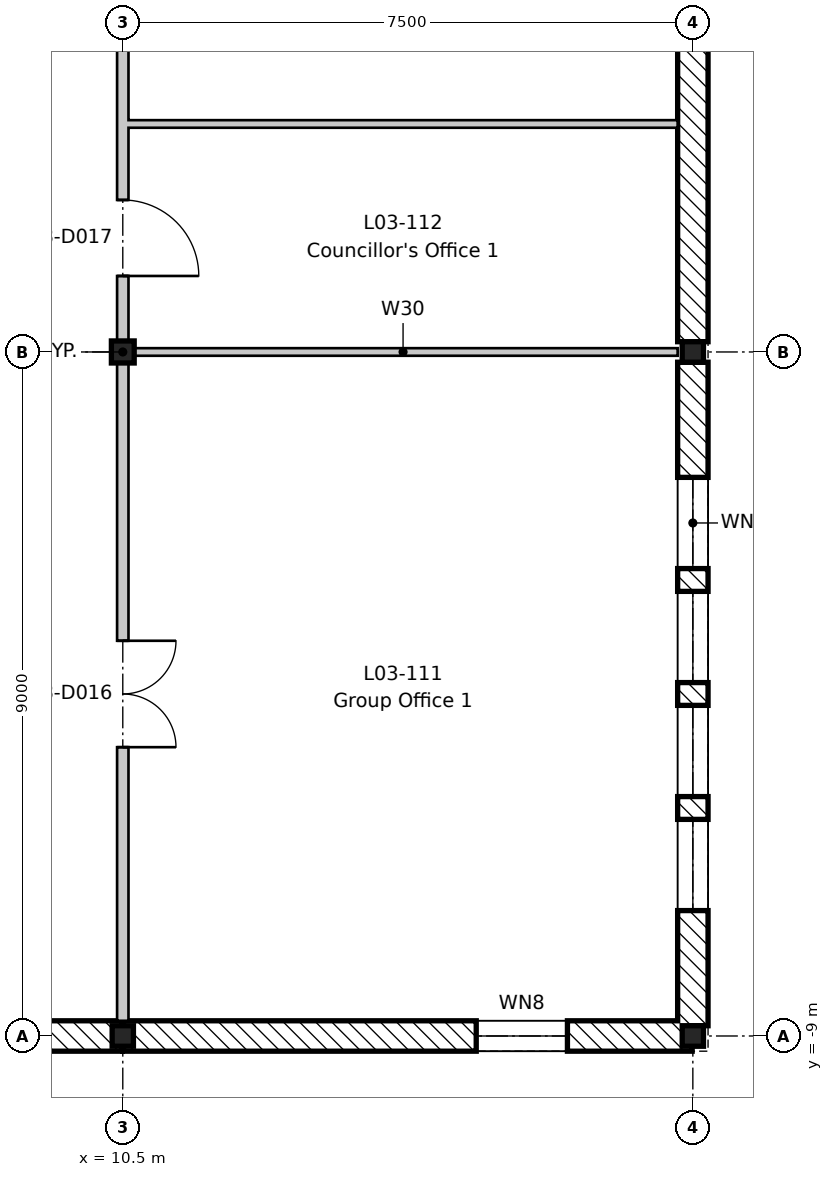
"""IFC4 building model, lengths in metres.
Left out: names, types, materials, properties, quantities, classifications, styles, units other than length and angle.
Written with IfcOpenShell. Run it as: python <this file> out.ifc"""

import sys

from ifc_helpers import new_model, si_unit, direction, frame, frame_2d, origin, origin_2d, place, context, subcontext, project, spatial, rectangle, i_section, extrude, element, fill, save


model = new_model("IFC4")
c1 = context("Model", 3, precision=1e-05, world=origin(), true_north=direction((0.0, 1.0)))
c2 = subcontext(c1, "Body", "Model", "MODEL_VIEW")
j1 = project(units=[si_unit("LENGTHUNIT", "METRE"), si_unit("PLANEANGLEUNIT", "RADIAN")], contexts=[c1])
p1 = place(None, origin())
s1 = spatial("IfcSite", under=j1, at=p1, CompositionType="ELEMENT")
p2 = place(p1, origin())
s2 = spatial("IfcBuilding", under=s1, at=p2, CompositionType="ELEMENT")
p3 = place(p2, frame((0.0, 0.0, 14.4)))
s3 = spatial("IfcBuildingStorey", under=s2, at=p3, CompositionType="ELEMENT", Elevation=14.4)
p4 = place(p3, frame((10.5, -9.0, -0.2), z_axis=(0.0, 0.0, 1.0), x_axis=(1.0, 0.0, 0.0)))
e1 = element("IfcColumn", 1, at=p4, inside=s3, PredefinedType="COLUMN", context=c2, shape_type="SweptSolid", body=[
    extrude(i_section(OverallWidth=0.28, OverallDepth=0.27, WebThickness=0.008, FlangeThickness=0.013, FilletRadius=0.024, at=origin_2d()), origin(), (0.0, 0.0, 1.0), 4.2),
])
p5 = place(p3, frame((10.5, 0.0, -0.2), z_axis=(0.0, 0.0, 1.0), x_axis=(1.0, 0.0, 0.0)))
e2 = element("IfcColumn", 2, at=p5, inside=s3, PredefinedType="COLUMN", context=c2, shape_type="SweptSolid", body=[
    extrude(i_section(OverallWidth=0.3, OverallDepth=0.29, WebThickness=0.009, FlangeThickness=0.014, FilletRadius=0.027, at=origin_2d()), origin(), (0.0, 0.0, 1.0), 4.2),
])
for number, where, z_axis, x_axis in (
    (3, (18.0, -9.0, -0.2), (0.0, 0.0, 1.0), (1.0, 0.0, 0.0)),
    (4, (18.0, 0.0, -0.2), (0.0, 0.0, 1.0), (1.0, 0.0, 0.0)),
):
    element("IfcColumn", number, at=place(p3, frame(where, z_axis=z_axis, x_axis=x_axis)), inside=s3, PredefinedType="COLUMN", context=c2, shape_type="SweptSolid", body=[
        extrude(i_section(OverallWidth=0.28, OverallDepth=0.27, WebThickness=0.008, FlangeThickness=0.013, FilletRadius=0.024, at=origin_2d()), origin(), (0.0, 0.0, 1.0), 4.2),
    ])
p6 = place(p3, frame((18.0, -0.135, 0.0), z_axis=(0.0, 0.0, 1.0), x_axis=(0.0, -1.0, 0.0)))
e5 = element("IfcWall", 5, at=p6, inside=s3, PredefinedType="STANDARD", context=c2, shape_type="SweptSolid", body=[
    extrude(rectangle(XDim=8.73, YDim=0.4, at=frame_2d((4.365, 0.0))), origin(), (0.0, 0.0, 1.0), 3.6),
])
p7 = place(p6, frame((6.015, 0.0, 0.6)))
e6 = element("IfcOpeningElement", 6, at=p7, cuts=e5, PredefinedType="OPENING", context=c2, shape_type="SweptSolid", body=[
    extrude(rectangle(XDim=1.2, YDim=2.7, at=frame_2d((0.6, 1.35))), frame((0.0, 0.21, 0.0), z_axis=(0.0, -1.0, 0.0), x_axis=(1.0, 0.0, 0.0)), (0.0, 0.0, 1.0), 0.42),
])
p8 = place(p6, frame((4.515, 0.0, 0.6)))
e7 = element("IfcOpeningElement", 7, at=p8, cuts=e5, PredefinedType="OPENING", context=c2, shape_type="SweptSolid", body=[
    extrude(rectangle(XDim=1.2, YDim=2.7, at=frame_2d((0.6, 1.35))), frame((0.0, 0.21, 0.0), z_axis=(0.0, -1.0, 0.0), x_axis=(1.0, 0.0, 0.0)), (0.0, 0.0, 1.0), 0.42),
])
p9 = place(p6, frame((3.015, 0.0, 0.6)))
e8 = element("IfcOpeningElement", 8, at=p9, cuts=e5, PredefinedType="OPENING", context=c2, shape_type="SweptSolid", body=[
    extrude(rectangle(XDim=1.2, YDim=2.7, at=frame_2d((0.6, 1.35))), frame((0.0, 0.21, 0.0), z_axis=(0.0, -1.0, 0.0), x_axis=(1.0, 0.0, 0.0)), (0.0, 0.0, 1.0), 0.42),
])
p10 = place(p6, frame((1.515, 0.0, 0.6)))
e9 = element("IfcOpeningElement", 9, at=p10, cuts=e5, PredefinedType="OPENING", context=c2, shape_type="SweptSolid", body=[
    extrude(rectangle(XDim=1.2, YDim=2.7, at=frame_2d((0.6, 1.35))), frame((0.0, 0.21, 0.0), z_axis=(0.0, -1.0, 0.0), x_axis=(1.0, 0.0, 0.0)), (0.0, 0.0, 1.0), 0.42),
])
p11 = place(p3, frame((18.0, 8.865, 0.0), z_axis=(0.0, 0.0, 1.0), x_axis=(0.0, -1.0, 0.0)))
e10 = element("IfcWall", 10, at=p11, inside=s3, PredefinedType="STANDARD", context=c2, shape_type="SweptSolid", body=[
    extrude(rectangle(XDim=8.73, YDim=0.4, at=frame_2d((4.365, 0.0))), origin(), (0.0, 0.0, 1.0), 3.6),
])
p12 = place(p3, frame((10.491, -9.0, 0.0), z_axis=(0.0, 0.0, 1.0), x_axis=(-1.0, 0.0, 0.0)))
e11 = element("IfcWall", 11, at=p12, inside=s3, PredefinedType="STANDARD", context=c2, shape_type="SweptSolid", body=[
    extrude(rectangle(XDim=2.982, YDim=0.4, at=frame_2d((1.491, 0.0))), origin(), (0.0, 0.0, 1.0), 3.8),
])
p13 = place(p3, frame((17.991, -9.0, 0.0), z_axis=(0.0, 0.0, 1.0), x_axis=(-1.0, 0.0, 0.0)))
e12 = element("IfcWall", 12, at=p13, inside=s3, PredefinedType="STANDARD", context=c2, shape_type="SweptSolid", body=[
    extrude(rectangle(XDim=7.482, YDim=0.4, at=frame_2d((3.741, 0.0))), origin(), (0.0, 0.0, 1.0), 3.67),
])
p14 = place(p13, frame((1.641, 0.0, 0.6)))
e13 = element("IfcOpeningElement", 13, at=p14, cuts=e12, PredefinedType="OPENING", context=c2, shape_type="SweptSolid", body=[
    extrude(rectangle(XDim=1.2, YDim=2.7, at=frame_2d((0.6, 1.35))), frame((0.0, 0.21, 0.0), z_axis=(0.0, -1.0, 0.0), x_axis=(1.0, 0.0, 0.0)), (0.0, 0.0, 1.0), 0.42),
])
p15 = place(p3, frame((10.575, 0.0, 0.0), z_axis=(0.0, 0.0, 1.0), x_axis=(1.0, 0.0, 0.0)))
e14 = element("IfcWall", 14, at=p15, inside=s3, PredefinedType="PARTITIONING", context=c2, shape_type="SweptSolid", body=[
    extrude(rectangle(XDim=7.225, YDim=0.1, at=frame_2d((3.613, 0.0))), origin(), (0.0, 0.0, 1.0), 3.65),
])
p16 = place(p3, frame((10.575, 3.0, 0.0), z_axis=(0.0, 0.0, 1.0), x_axis=(1.0, 0.0, 0.0)))
e15 = element("IfcWall", 15, at=p16, inside=s3, PredefinedType="PARTITIONING", context=c2, shape_type="SweptSolid", body=[
    extrude(rectangle(XDim=7.225, YDim=0.1, at=frame_2d((3.613, 0.0))), origin(), (0.0, 0.0, 1.0), 4.0),
])
p17 = place(p3, frame((10.5, -8.8, 0.0), z_axis=(0.0, 0.0, 1.0), x_axis=(0.0, 1.0, 0.0)))
e16 = element("IfcWall", 16, at=p17, inside=s3, PredefinedType="PARTITIONING", context=c2, shape_type="SweptSolid", body=[
    extrude(rectangle(XDim=79.3, YDim=0.15, at=frame_2d((39.65, 0.0))), origin(), (0.0, 0.0, 1.0), 3.48),
])
p18 = place(p17, frame((3.6, 0.0, 0.0)))
e17 = element("IfcOpeningElement", 17, at=p18, cuts=e16, PredefinedType="OPENING", context=c2, shape_type="SweptSolid", body=[
    extrude(rectangle(XDim=1.4, YDim=2.1, at=frame_2d((0.7, 1.05))), frame((0.0, 0.085, 0.0), z_axis=(0.0, -1.0, 0.0), x_axis=(1.0, 0.0, 0.0)), (0.0, 0.0, 1.0), 0.17),
])
p19 = place(p17, frame((9.8, 0.0, 0.0)))
e18 = element("IfcOpeningElement", 18, at=p19, cuts=e16, PredefinedType="OPENING", context=c2, shape_type="SweptSolid", body=[
    extrude(rectangle(XDim=1.0, YDim=2.1, at=frame_2d((0.5, 1.05))), frame((0.0, 0.085, 0.0), z_axis=(0.0, -1.0, 0.0), x_axis=(1.0, 0.0, 0.0)), (0.0, 0.0, 1.0), 0.17),
])
p20 = place(p17, frame((12.8, 0.0, 0.0)))
e19 = element("IfcOpeningElement", 19, at=p20, cuts=e16, PredefinedType="OPENING", context=c2, shape_type="SweptSolid", body=[
    extrude(rectangle(XDim=1.0, YDim=2.1, at=frame_2d((0.5, 1.05))), frame((0.0, 0.085, 0.0), z_axis=(0.0, -1.0, 0.0), x_axis=(1.0, 0.0, 0.0)), (0.0, 0.0, 1.0), 0.17),
])
p21 = place(p17, frame((15.8, 0.0, 0.0)))
e20 = element("IfcOpeningElement", 20, at=p21, cuts=e16, PredefinedType="OPENING", context=c2, shape_type="SweptSolid", body=[
    extrude(rectangle(XDim=1.0, YDim=2.1, at=frame_2d((0.5, 1.05))), frame((0.0, 0.085, 0.0), z_axis=(0.0, -1.0, 0.0), x_axis=(1.0, 0.0, 0.0)), (0.0, 0.0, 1.0), 0.17),
])
p22 = place(p17, frame((18.8, 0.0, 0.0)))
e21 = element("IfcOpeningElement", 21, at=p22, cuts=e16, PredefinedType="OPENING", context=c2, shape_type="SweptSolid", body=[
    extrude(rectangle(XDim=1.0, YDim=2.1, at=frame_2d((0.5, 1.05))), frame((0.0, 0.085, 0.0), z_axis=(0.0, -1.0, 0.0), x_axis=(1.0, 0.0, 0.0)), (0.0, 0.0, 1.0), 0.17),
])
p23 = place(p17, frame((21.8, 0.0, 0.0)))
e22 = element("IfcOpeningElement", 22, at=p23, cuts=e16, PredefinedType="OPENING", context=c2, shape_type="SweptSolid", body=[
    extrude(rectangle(XDim=1.0, YDim=2.1, at=frame_2d((0.5, 1.05))), frame((0.0, 0.085, 0.0), z_axis=(0.0, -1.0, 0.0), x_axis=(1.0, 0.0, 0.0)), (0.0, 0.0, 1.0), 0.17),
])
p24 = place(p17, frame((27.6, 0.0, 0.0)))
e23 = element("IfcOpeningElement", 23, at=p24, cuts=e16, PredefinedType="OPENING", context=c2, shape_type="SweptSolid", body=[
    extrude(rectangle(XDim=1.4, YDim=2.1, at=frame_2d((0.7, 1.05))), frame((0.0, 0.085, 0.0), z_axis=(0.0, -1.0, 0.0), x_axis=(1.0, 0.0, 0.0)), (0.0, 0.0, 1.0), 0.17),
])
p25 = place(p17, frame((36.55, 0.0, 0.0)))
e24 = element("IfcOpeningElement", 24, at=p25, cuts=e16, PredefinedType="OPENING", context=c2, shape_type="SweptSolid", body=[
    extrude(rectangle(XDim=1.0, YDim=2.1, at=frame_2d((0.5, 1.05))), frame((0.0, 0.085, 0.0), z_axis=(0.0, -1.0, 0.0), x_axis=(1.0, 0.0, 0.0)), (0.0, 0.0, 1.0), 0.17),
])
p26 = place(p17, frame((39.8, 0.0, 0.0)))
e25 = element("IfcOpeningElement", 25, at=p26, cuts=e16, PredefinedType="OPENING", context=c2, shape_type="SweptSolid", body=[
    extrude(rectangle(XDim=1.0, YDim=2.1, at=frame_2d((0.5, 1.05))), frame((0.0, 0.085, 0.0), z_axis=(0.0, -1.0, 0.0), x_axis=(1.0, 0.0, 0.0)), (0.0, 0.0, 1.0), 0.17),
])
p27 = place(p17, frame((42.8, 0.0, 0.0)))
e26 = element("IfcOpeningElement", 26, at=p27, cuts=e16, PredefinedType="OPENING", context=c2, shape_type="SweptSolid", body=[
    extrude(rectangle(XDim=1.0, YDim=2.1, at=frame_2d((0.5, 1.05))), frame((0.0, 0.085, 0.0), z_axis=(0.0, -1.0, 0.0), x_axis=(1.0, 0.0, 0.0)), (0.0, 0.0, 1.0), 0.17),
])
p28 = place(p17, frame((47.3, 0.0, 0.0)))
e27 = element("IfcOpeningElement", 27, at=p28, cuts=e16, PredefinedType="OPENING", context=c2, shape_type="SweptSolid", body=[
    extrude(rectangle(XDim=1.0, YDim=2.1, at=frame_2d((0.5, 1.05))), frame((0.0, 0.085, 0.0), z_axis=(0.0, -1.0, 0.0), x_axis=(1.0, 0.0, 0.0)), (0.0, 0.0, 1.0), 0.17),
])
p29 = place(p17, frame((51.8, 0.0, 0.0)))
e28 = element("IfcOpeningElement", 28, at=p29, cuts=e16, PredefinedType="OPENING", context=c2, shape_type="SweptSolid", body=[
    extrude(rectangle(XDim=1.0, YDim=2.1, at=frame_2d((0.5, 1.05))), frame((0.0, 0.085, 0.0), z_axis=(0.0, -1.0, 0.0), x_axis=(1.0, 0.0, 0.0)), (0.0, 0.0, 1.0), 0.17),
])
p30 = place(p17, frame((56.3, 0.0, 0.0)))
e29 = element("IfcOpeningElement", 29, at=p30, cuts=e16, PredefinedType="OPENING", context=c2, shape_type="SweptSolid", body=[
    extrude(rectangle(XDim=1.0, YDim=2.1, at=frame_2d((0.5, 1.05))), frame((0.0, 0.085, 0.0), z_axis=(0.0, -1.0, 0.0), x_axis=(1.0, 0.0, 0.0)), (0.0, 0.0, 1.0), 0.17),
])
p31 = place(p17, frame((60.8, 0.0, 0.0)))
e30 = element("IfcOpeningElement", 30, at=p31, cuts=e16, PredefinedType="OPENING", context=c2, shape_type="SweptSolid", body=[
    extrude(rectangle(XDim=1.0, YDim=2.1, at=frame_2d((0.5, 1.05))), frame((0.0, 0.085, 0.0), z_axis=(0.0, -1.0, 0.0), x_axis=(1.0, 0.0, 0.0)), (0.0, 0.0, 1.0), 0.17),
])
p32 = place(p17, frame((63.8, 0.0, 0.0)))
e31 = element("IfcOpeningElement", 31, at=p32, cuts=e16, PredefinedType="OPENING", context=c2, shape_type="SweptSolid", body=[
    extrude(rectangle(XDim=1.0, YDim=2.1, at=frame_2d((0.5, 1.05))), frame((0.0, 0.085, 0.0), z_axis=(0.0, -1.0, 0.0), x_axis=(1.0, 0.0, 0.0)), (0.0, 0.0, 1.0), 0.17),
])
p33 = place(p17, frame((66.8, 0.0, 0.0)))
e32 = element("IfcOpeningElement", 32, at=p33, cuts=e16, PredefinedType="OPENING", context=c2, shape_type="SweptSolid", body=[
    extrude(rectangle(XDim=1.0, YDim=2.1, at=frame_2d((0.5, 1.05))), frame((0.0, 0.085, 0.0), z_axis=(0.0, -1.0, 0.0), x_axis=(1.0, 0.0, 0.0)), (0.0, 0.0, 1.0), 0.17),
])
p34 = place(p17, frame((69.8, 0.0, 0.0)))
e33 = element("IfcOpeningElement", 33, at=p34, cuts=e16, PredefinedType="OPENING", context=c2, shape_type="SweptSolid", body=[
    extrude(rectangle(XDim=1.0, YDim=2.1, at=frame_2d((0.5, 1.05))), frame((0.0, 0.085, 0.0), z_axis=(0.0, -1.0, 0.0), x_axis=(1.0, 0.0, 0.0)), (0.0, 0.0, 1.0), 0.17),
])
p35 = place(p17, frame((72.8, 0.0, 0.0)))
e34 = element("IfcOpeningElement", 34, at=p35, cuts=e16, PredefinedType="OPENING", context=c2, shape_type="SweptSolid", body=[
    extrude(rectangle(XDim=1.0, YDim=2.1, at=frame_2d((0.5, 1.05))), frame((0.0, 0.085, 0.0), z_axis=(0.0, -1.0, 0.0), x_axis=(1.0, 0.0, 0.0)), (0.0, 0.0, 1.0), 0.17),
])
p36 = place(p7, origin())
e35 = element("IfcWindow", 35, at=p36, inside=s3, PartitioningType="SINGLE_PANEL", PredefinedType="WINDOW", context=c2, shape_type="SweptSolid", body=[
    extrude(rectangle(XDim=1.2, YDim=2.7, at=frame_2d((0.6, 1.35))), frame((0.0, 0.03, 0.0), z_axis=(0.0, -1.0, 0.0), x_axis=(1.0, 0.0, 0.0)), (0.0, 0.0, 1.0), 0.06),
])
fill(e6, e35)
p37 = place(p8, origin())
e36 = element("IfcWindow", 36, at=p37, inside=s3, PartitioningType="SINGLE_PANEL", PredefinedType="WINDOW", context=c2, shape_type="SweptSolid", body=[
    extrude(rectangle(XDim=1.2, YDim=2.7, at=frame_2d((0.6, 1.35))), frame((0.0, 0.03, 0.0), z_axis=(0.0, -1.0, 0.0), x_axis=(1.0, 0.0, 0.0)), (0.0, 0.0, 1.0), 0.06),
])
fill(e7, e36)
p38 = place(p9, origin())
e37 = element("IfcWindow", 37, at=p38, inside=s3, PartitioningType="SINGLE_PANEL", PredefinedType="WINDOW", context=c2, shape_type="SweptSolid", body=[
    extrude(rectangle(XDim=1.2, YDim=2.7, at=frame_2d((0.6, 1.35))), frame((0.0, 0.03, 0.0), z_axis=(0.0, -1.0, 0.0), x_axis=(1.0, 0.0, 0.0)), (0.0, 0.0, 1.0), 0.06),
])
fill(e8, e37)
p39 = place(p10, origin())
e38 = element("IfcWindow", 38, at=p39, inside=s3, PartitioningType="SINGLE_PANEL", PredefinedType="WINDOW", context=c2, shape_type="SweptSolid", body=[
    extrude(rectangle(XDim=1.2, YDim=2.7, at=frame_2d((0.6, 1.35))), frame((0.0, 0.03, 0.0), z_axis=(0.0, -1.0, 0.0), x_axis=(1.0, 0.0, 0.0)), (0.0, 0.0, 1.0), 0.06),
])
fill(e9, e38)
p40 = place(p14, origin())
e39 = element("IfcWindow", 39, at=p40, inside=s3, PartitioningType="SINGLE_PANEL", PredefinedType="WINDOW", context=c2, shape_type="SweptSolid", body=[
    extrude(rectangle(XDim=1.2, YDim=2.7, at=frame_2d((0.6, 1.35))), frame((0.0, 0.03, 0.0), z_axis=(0.0, -1.0, 0.0), x_axis=(1.0, 0.0, 0.0)), (0.0, 0.0, 1.0), 0.06),
])
fill(e13, e39)
p41 = place(p18, frame((1.4, 0.0, 0.0), z_axis=(0.0, 0.0, 1.0), x_axis=(-1.0, 0.0, 0.0)))
e40 = element("IfcDoor", 40, at=p41, inside=s3, OperationType="DOUBLE_DOOR_SINGLE_SWING", PredefinedType="DOOR", context=c2, shape_type="SweptSolid", body=[
    extrude(rectangle(XDim=1.4, YDim=2.1, at=frame_2d((0.7, 1.05))), frame((0.0, 0.025, 0.0), z_axis=(0.0, -1.0, 0.0), x_axis=(1.0, 0.0, 0.0)), (0.0, 0.0, 1.0), 0.05),
])
fill(e17, e40)
p42 = place(p19, frame((1.0, 0.0, 0.0), z_axis=(0.0, 0.0, 1.0), x_axis=(-1.0, 0.0, 0.0)))
e41 = element("IfcDoor", 41, at=p42, inside=s3, OperationType="SINGLE_SWING_RIGHT", PredefinedType="DOOR", context=c2, shape_type="SweptSolid", body=[
    extrude(rectangle(XDim=1.0, YDim=2.1, at=frame_2d((0.5, 1.05))), frame((0.0, 0.025, 0.0), z_axis=(0.0, -1.0, 0.0), x_axis=(1.0, 0.0, 0.0)), (0.0, 0.0, 1.0), 0.05),
])
fill(e18, e41)
save(model, sys.argv[1])
